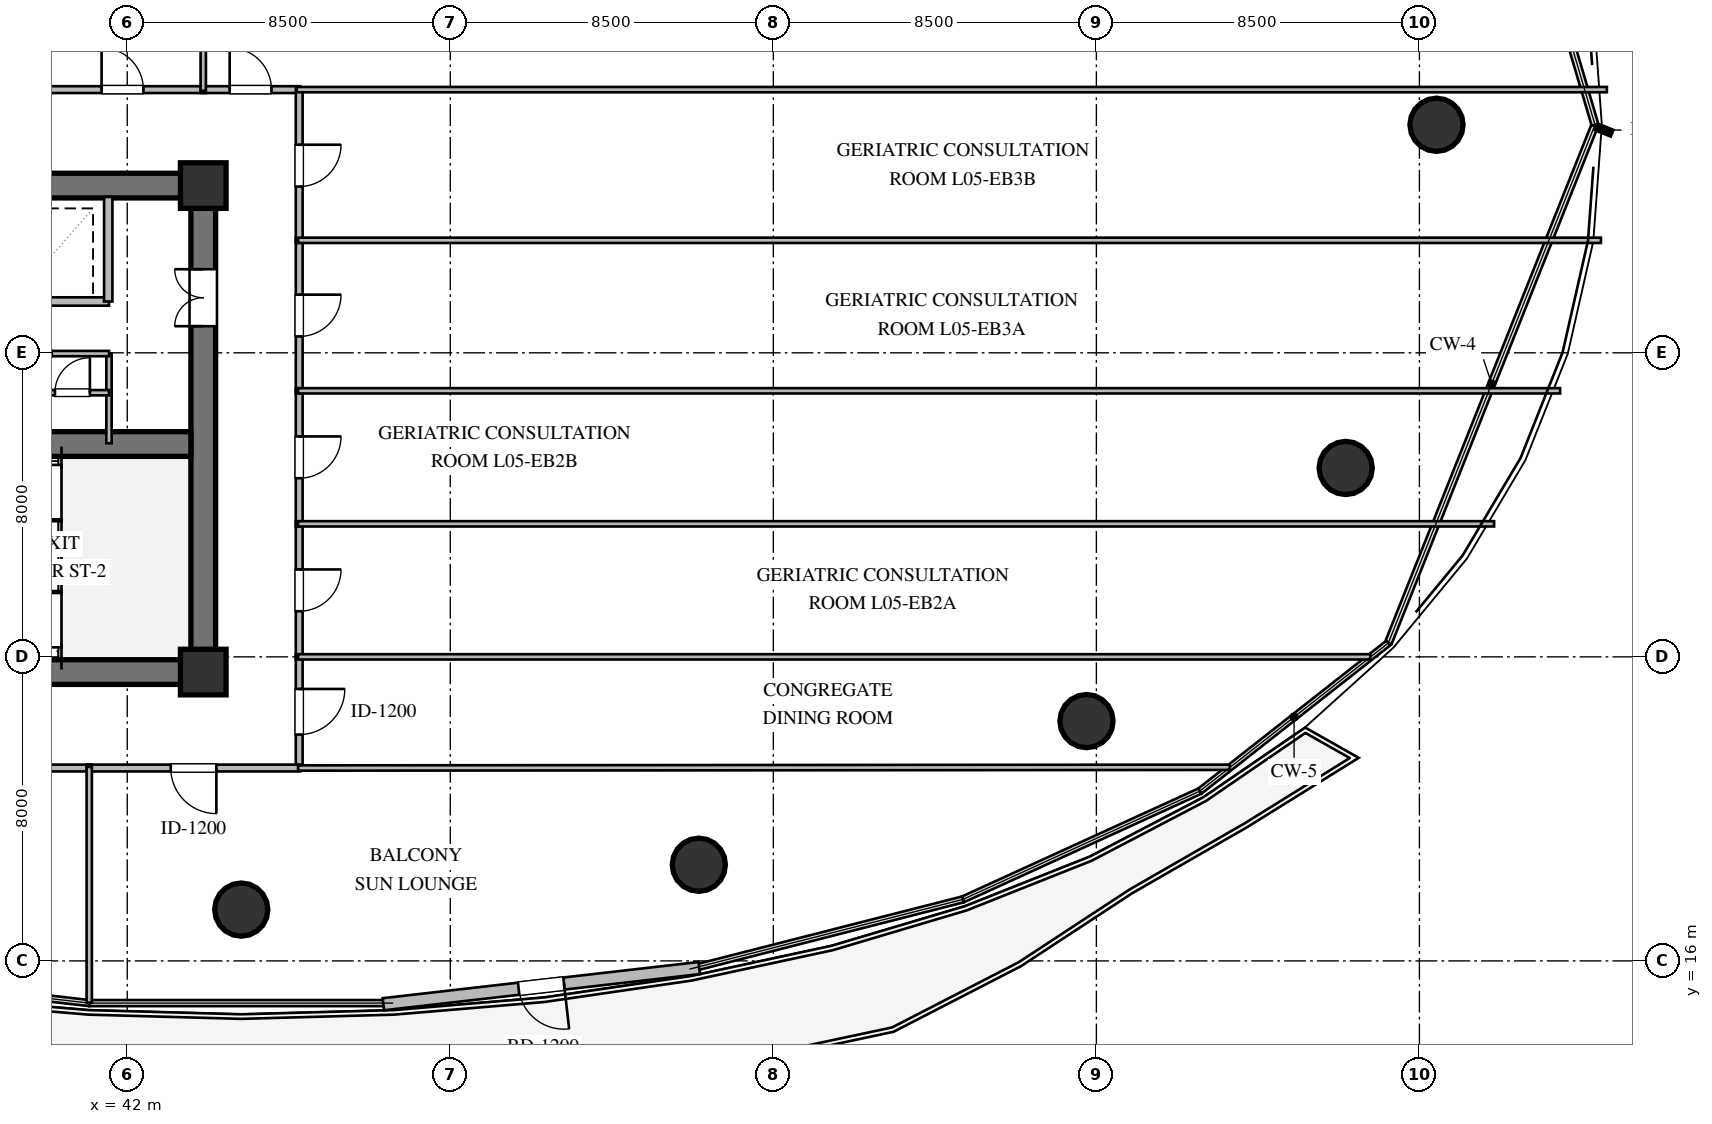
"""IFC4 building model, lengths in metres.
Left out: names, types, materials, properties, quantities, classifications, styles, units other than length and angle.
Written with IfcOpenShell. Run it as: python <this file> out.ifc"""

import sys

from ifc_helpers import new_model, si_unit, direction, frame, frame_2d, origin, origin_2d, place, context, subcontext, project, spatial, rectangle, circle, extrude, element, fill, save


model = new_model("IFC4")
c1 = context("Model", 3, precision=1e-05, world=origin(), true_north=direction((0.0, 1.0)))
c2 = subcontext(c1, "Body", "Model", "MODEL_VIEW")
j1 = project(units=[si_unit("LENGTHUNIT", "METRE"), si_unit("PLANEANGLEUNIT", "RADIAN")], contexts=[c1])
p1 = place(None, origin())
s1 = spatial("IfcSite", under=j1, at=p1, CompositionType="ELEMENT")
p2 = place(p1, origin())
s2 = spatial("IfcBuilding", under=s1, at=p2, CompositionType="ELEMENT")
p3 = place(p2, frame((0.0, 0.0, 24.0)))
s3 = spatial("IfcBuildingStorey", under=s2, at=p3, CompositionType="ELEMENT", Elevation=24.0)
for number, where, z_axis, x_axis in (
    (1, (21.675, 23.6, 0.0), (0.0, 0.0, 1.0), (1.0, 0.0, 0.0)),
    (2, (21.675, 36.4, 0.0), (0.0, 0.0, 1.0), (1.0, 0.0, 0.0)),
):
    element("IfcWall", number, at=place(p3, frame(where, z_axis=z_axis, x_axis=x_axis)), inside=s3, PredefinedType="SHEAR", context=c2, shape_type="SweptSolid", body=[
        extrude(rectangle(XDim=22.65, YDim=0.65, at=frame_2d((11.325, 0.0))), origin(), (0.0, 0.0, 1.0), 3.36),
    ])
p4 = place(p3, frame((44.0, 23.925, 0.0), z_axis=(0.0, 0.0, 1.0), x_axis=(0.0, 1.0, 0.0)))
e3 = element("IfcWall", 3, at=p4, inside=s3, PredefinedType="SHEAR", context=c2, shape_type="SweptSolid", body=[
    extrude(rectangle(XDim=12.15, YDim=0.65, at=frame_2d((6.075, 0.0))), origin(), (0.0, 0.0, 1.0), 3.36),
])
p5 = place(p4, frame((8.775, 0.0, 0.0)))
e4 = element("IfcOpeningElement", 4, at=p5, cuts=e3, PredefinedType="OPENING", context=c2, shape_type="SweptSolid", body=[
    extrude(rectangle(XDim=1.5, YDim=2.15, at=frame_2d((0.75, 1.075))), frame((0.0, 0.335, 0.0), z_axis=(0.0, -1.0, 0.0), x_axis=(1.0, 0.0, 0.0)), (0.0, 0.0, 1.0), 0.67),
])
p6 = place(p3, frame((22.325, 29.6, 0.0), z_axis=(0.0, 0.0, 1.0), x_axis=(1.0, 0.0, 0.0)))
e5 = element("IfcWall", 5, at=p6, inside=s3, PredefinedType="SHEAR", context=c2, shape_type="SweptSolid", body=[
    extrude(rectangle(XDim=21.35, YDim=0.65, at=frame_2d((10.675, 0.0))), origin(), (0.0, 0.0, 1.0), 3.36),
])
p7 = place(p6, frame((12.125, 0.0, 0.0)))
e6 = element("IfcOpeningElement", 6, at=p7, cuts=e5, PredefinedType="OPENING", context=c2, shape_type="SweptSolid", body=[
    extrude(rectangle(XDim=1.15, YDim=2.1, at=frame_2d((0.575, 1.05))), frame((0.0, 0.335, 0.0), z_axis=(0.0, -1.0, 0.0), x_axis=(1.0, 0.0, 0.0)), (0.0, 0.0, 1.0), 0.67),
])
for number, where, z_axis, x_axis in (
    (7, (44.0, 23.6, 0.0), (0.0, 0.0, 1.0), (1.0, 0.0, 0.0)),
    (8, (44.0, 36.4, 0.0), (0.0, 0.0, 1.0), (1.0, 0.0, 0.0)),
):
    element("IfcColumn", number, at=place(p3, frame(where, z_axis=z_axis, x_axis=x_axis)), inside=s3, PredefinedType="COLUMN", context=c2, shape_type="SweptSolid", body=[
        extrude(rectangle(XDim=1.2, YDim=1.2, at=origin_2d()), origin(), (0.0, 0.0, 1.0), 3.6),
    ])
for number, where, z_axis, x_axis in (
    (9, (76.45, 38.0, 0.0), (0.0, 0.0, 1.0), (1.0, 0.0, 0.0)),
    (10, (45.0, 17.35, 0.0), (0.0, 0.0, 1.0), (1.0, 0.0, 0.0)),
    (11, (57.04, 18.53, 0.0), (0.0, 0.0, 1.0), (1.0, 0.0, 0.0)),
    (12, (67.24, 22.31, 0.0), (0.0, 0.0, 1.0), (1.0, 0.0, 0.0)),
    (13, (74.06, 28.97, 0.0), (0.0, 0.0, 1.0), (1.0, 0.0, 0.0)),
):
    element("IfcColumn", number, at=place(p3, frame(where, z_axis=z_axis, x_axis=x_axis)), inside=s3, PredefinedType="COLUMN", context=c2, shape_type="SweptSolid", body=[
        extrude(circle(Radius=0.7, at=origin_2d()), origin(), (0.0, 0.0, 1.0), 3.6),
    ])
p8 = place(p3, frame((57.05, 15.812, 0.0), z_axis=(0.0, 0.0, 1.0), x_axis=(-0.993503192468, -0.113804246649, 0.0)))
e14 = element("IfcWall", 14, at=p8, inside=s3, PredefinedType="STANDARD", context=c2, shape_type="SweptSolid", body=[
    extrude(rectangle(XDim=8.365, YDim=0.32, at=frame_2d((4.182, 0.0))), origin(), (0.0, 0.0, 1.0), 3.36),
])
p9 = place(p8, frame((3.582, 0.0, 0.0)))
e15 = element("IfcOpeningElement", 15, at=p9, cuts=e14, PredefinedType="OPENING", context=c2, shape_type="SweptSolid", body=[
    extrude(rectangle(XDim=1.2, YDim=2.15, at=frame_2d((0.6, 1.075))), frame((0.0, 0.17, 0.0), z_axis=(0.0, -1.0, 0.0), x_axis=(1.0, 0.0, 0.0)), (0.0, 0.0, 1.0), 0.34),
])
p10 = place(p3, frame((33.98, 33.35, 0.0), z_axis=(0.0, 0.0, 1.0), x_axis=(1.0, 0.0, 0.0)))
e16 = element("IfcWall", 16, at=p10, inside=s3, PredefinedType="SOLIDWALL", context=c2, shape_type="SweptSolid", body=[
    extrude(rectangle(XDim=7.54, YDim=0.22, at=frame_2d((3.77, 0.0))), origin(), (0.0, 0.0, 1.0), 3.36),
])
p11 = place(p3, frame((41.5, 33.35, 0.0), z_axis=(0.0, 0.0, 1.0), x_axis=(0.0, 1.0, 0.0)))
e17 = element("IfcWall", 17, at=p11, inside=s3, PredefinedType="SOLIDWALL", context=c2, shape_type="SweptSolid", body=[
    extrude(rectangle(XDim=2.75, YDim=0.22, at=frame_2d((1.375, 0.0))), origin(), (0.0, 0.0, 1.0), 3.36),
])
p12 = place(p3, frame((41.52, 29.62, 0.0), z_axis=(0.0, 0.0, 1.0), x_axis=(0.0, 1.0, 0.0)))
e18 = element("IfcWall", 18, at=p12, inside=s3, PredefinedType="PARTITIONING", context=c2, shape_type="SweptSolid", body=[
    extrude(rectangle(XDim=2.36, YDim=0.14, at=frame_2d((1.18, 0.0))), origin(), (0.0, 0.0, 1.0), 3.36),
])
p13 = place(p3, frame((38.48, 30.95, 0.0), z_axis=(0.0, 0.0, 1.0), x_axis=(1.0, 0.0, 0.0)))
e19 = element("IfcWall", 19, at=p13, inside=s3, PredefinedType="PARTITIONING", context=c2, shape_type="SweptSolid", body=[
    extrude(rectangle(XDim=3.04, YDim=0.14, at=frame_2d((1.52, 0.0))), origin(), (0.0, 0.0, 1.0), 3.36),
])
p14 = place(p13, frame((1.617, 0.0, 0.0)))
e20 = element("IfcOpeningElement", 20, at=p14, cuts=e19, PredefinedType="OPENING", context=c2, shape_type="SweptSolid", body=[
    extrude(rectangle(XDim=0.92, YDim=2.1, at=frame_2d((0.46, 1.05))), frame((0.0, 0.08, 0.0), z_axis=(0.0, -1.0, 0.0), x_axis=(1.0, 0.0, 0.0)), (0.0, 0.0, 1.0), 0.16),
])
p15 = place(p3, frame((38.48, 31.98, 0.0), z_axis=(0.0, 0.0, 1.0), x_axis=(1.0, 0.0, 0.0)))
e21 = element("IfcWall", 21, at=p15, inside=s3, PredefinedType="PARTITIONING", context=c2, shape_type="SweptSolid", body=[
    extrude(rectangle(XDim=3.04, YDim=0.14, at=frame_2d((1.52, 0.0))), origin(), (0.0, 0.0, 1.0), 3.36),
])
p16 = place(p15, frame((0.614, 0.0, 0.0)))
e22 = element("IfcOpeningElement", 22, at=p16, cuts=e21, PredefinedType="OPENING", context=c2, shape_type="SweptSolid", body=[
    extrude(rectangle(XDim=0.92, YDim=2.1, at=frame_2d((0.46, 1.05))), frame((0.0, 0.08, 0.0), z_axis=(0.0, -1.0, 0.0), x_axis=(1.0, 0.0, 0.0)), (0.0, 0.0, 1.0), 0.16),
])
p17 = place(p3, frame((39.685, 38.925, 0.0), z_axis=(0.0, 0.0, 1.0), x_axis=(1.0, 0.0, 0.0)))
e23 = element("IfcWall", 23, at=p17, inside=s3, PredefinedType="PARTITIONING", context=c2, shape_type="SweptSolid", body=[
    extrude(rectangle(XDim=4.38, YDim=0.18, at=frame_2d((2.19, 0.0))), origin(), (0.0, 0.0, 1.0), 3.36),
])
p18 = place(p17, frame((1.64, 0.0, 0.0)))
e24 = element("IfcOpeningElement", 24, at=p18, cuts=e23, PredefinedType="OPENING", context=c2, shape_type="SweptSolid", body=[
    extrude(rectangle(XDim=1.1, YDim=2.1, at=frame_2d((0.55, 1.05))), frame((0.0, 0.1, 0.0), z_axis=(0.0, -1.0, 0.0), x_axis=(1.0, 0.0, 0.0)), (0.0, 0.0, 1.0), 0.2),
])
p19 = place(p3, frame((43.935, 38.925, 0.0), z_axis=(0.0, 0.0, 1.0), x_axis=(1.0, 0.0, 0.0)))
e25 = element("IfcWall", 25, at=p19, inside=s3, PredefinedType="PARTITIONING", context=c2, shape_type="SweptSolid", body=[
    extrude(rectangle(XDim=2.62, YDim=0.18, at=frame_2d((1.31, 0.0))), origin(), (0.0, 0.0, 1.0), 3.36),
])
p20 = place(p19, frame((0.76, 0.0, 0.0)))
e26 = element("IfcOpeningElement", 26, at=p20, cuts=e25, PredefinedType="OPENING", context=c2, shape_type="SweptSolid", body=[
    extrude(rectangle(XDim=1.1, YDim=2.1, at=frame_2d((0.55, 1.05))), frame((0.0, 0.1, 0.0), z_axis=(0.0, -1.0, 0.0), x_axis=(1.0, 0.0, 0.0)), (0.0, 0.0, 1.0), 0.2),
])
p21 = place(p3, frame((46.525, 24.065, 0.0), z_axis=(0.0, 0.0, 1.0), x_axis=(0.0, -1.0, 0.0)))
e27 = element("IfcWall", 27, at=p21, inside=s3, PredefinedType="PARTITIONING", context=c2, shape_type="SweptSolid", body=[
    extrude(rectangle(XDim=3.02, YDim=0.18, at=frame_2d((1.51, 0.0))), origin(), (0.0, 0.0, 1.0), 3.36),
])
p22 = place(p21, frame((0.91, 0.0, 0.0)))
e28 = element("IfcOpeningElement", 28, at=p22, cuts=e27, PredefinedType="OPENING", context=c2, shape_type="SweptSolid", body=[
    extrude(rectangle(XDim=1.2, YDim=2.15, at=frame_2d((0.6, 1.075))), frame((0.0, 0.1, 0.0), z_axis=(0.0, -1.0, 0.0), x_axis=(1.0, 0.0, 0.0)), (0.0, 0.0, 1.0), 0.2),
])
p23 = place(p3, frame((46.525, 27.565, 0.0), z_axis=(0.0, 0.0, 1.0), x_axis=(0.0, -1.0, 0.0)))
e29 = element("IfcWall", 29, at=p23, inside=s3, PredefinedType="PARTITIONING", context=c2, shape_type="SweptSolid", body=[
    extrude(rectangle(XDim=3.63, YDim=0.18, at=frame_2d((1.815, 0.0))), origin(), (0.0, 0.0, 1.0), 3.36),
])
p24 = place(p23, frame((1.265, 0.0, 0.0)))
e30 = element("IfcOpeningElement", 30, at=p24, cuts=e29, PredefinedType="OPENING", context=c2, shape_type="SweptSolid", body=[
    extrude(rectangle(XDim=1.1, YDim=2.1, at=frame_2d((0.55, 1.05))), frame((0.0, 0.1, 0.0), z_axis=(0.0, -1.0, 0.0), x_axis=(1.0, 0.0, 0.0)), (0.0, 0.0, 1.0), 0.2),
])
p25 = place(p3, frame((46.525, 31.065, 0.0), z_axis=(0.0, 0.0, 1.0), x_axis=(0.0, -1.0, 0.0)))
e31 = element("IfcWall", 31, at=p25, inside=s3, PredefinedType="PARTITIONING", context=c2, shape_type="SweptSolid", body=[
    extrude(rectangle(XDim=3.63, YDim=0.18, at=frame_2d((1.815, 0.0))), origin(), (0.0, 0.0, 1.0), 3.36),
])
p26 = place(p25, frame((1.265, 0.0, 0.0)))
e32 = element("IfcOpeningElement", 32, at=p26, cuts=e31, PredefinedType="OPENING", context=c2, shape_type="SweptSolid", body=[
    extrude(rectangle(XDim=1.1, YDim=2.1, at=frame_2d((0.55, 1.05))), frame((0.0, 0.1, 0.0), z_axis=(0.0, -1.0, 0.0), x_axis=(1.0, 0.0, 0.0)), (0.0, 0.0, 1.0), 0.2),
])
p27 = place(p3, frame((46.525, 35.025, 0.0), z_axis=(0.0, 0.0, 1.0), x_axis=(0.0, -1.0, 0.0)))
e33 = element("IfcWall", 33, at=p27, inside=s3, PredefinedType="PARTITIONING", context=c2, shape_type="SweptSolid", body=[
    extrude(rectangle(XDim=4.09, YDim=0.18, at=frame_2d((2.045, 0.0))), origin(), (0.0, 0.0, 1.0), 3.36),
])
p28 = place(p27, frame((1.495, 0.0, 0.0)))
e34 = element("IfcOpeningElement", 34, at=p28, cuts=e33, PredefinedType="OPENING", context=c2, shape_type="SweptSolid", body=[
    extrude(rectangle(XDim=1.1, YDim=2.1, at=frame_2d((0.55, 1.05))), frame((0.0, 0.1, 0.0), z_axis=(0.0, -1.0, 0.0), x_axis=(1.0, 0.0, 0.0)), (0.0, 0.0, 1.0), 0.2),
])
p29 = place(p3, frame((46.525, 38.955, 0.0), z_axis=(0.0, 0.0, 1.0), x_axis=(0.0, -1.0, 0.0)))
e35 = element("IfcWall", 35, at=p29, inside=s3, PredefinedType="PARTITIONING", context=c2, shape_type="SweptSolid", body=[
    extrude(rectangle(XDim=4.06, YDim=0.18, at=frame_2d((2.03, 0.0))), origin(), (0.0, 0.0, 1.0), 3.36),
])
p30 = place(p29, frame((1.48, 0.0, 0.0)))
e36 = element("IfcOpeningElement", 36, at=p30, cuts=e35, PredefinedType="OPENING", context=c2, shape_type="SweptSolid", body=[
    extrude(rectangle(XDim=1.1, YDim=2.1, at=frame_2d((0.55, 1.05))), frame((0.0, 0.1, 0.0), z_axis=(0.0, -1.0, 0.0), x_axis=(1.0, 0.0, 0.0)), (0.0, 0.0, 1.0), 0.2),
])
p31 = place(p3, frame((41.065, 21.075, 0.0), z_axis=(0.0, 0.0, 1.0), x_axis=(-1.0, 0.0, 0.0)))
e37 = element("IfcWall", 37, at=p31, inside=s3, PredefinedType="PARTITIONING", context=c2, shape_type="SweptSolid", body=[
    extrude(rectangle(XDim=7.13, YDim=0.18, at=frame_2d((3.565, 0.0))), origin(), (0.0, 0.0, 1.0), 2.996),
])
p32 = place(p31, frame((3.015, 0.0, 0.0)))
e38 = element("IfcOpeningElement", 38, at=p32, cuts=e37, PredefinedType="OPENING", context=c2, shape_type="SweptSolid", body=[
    extrude(rectangle(XDim=1.1, YDim=2.1, at=frame_2d((0.55, 1.05))), frame((0.0, 0.1, 0.0), z_axis=(0.0, -1.0, 0.0), x_axis=(1.0, 0.0, 0.0)), (0.0, 0.0, 1.0), 0.2),
])
p33 = place(p3, frame((46.555, 21.075, 0.0), z_axis=(0.0, 0.0, 1.0), x_axis=(-1.0, 0.0, 0.0)))
e39 = element("IfcWall", 39, at=p33, inside=s3, PredefinedType="PARTITIONING", context=c2, shape_type="SweptSolid", body=[
    extrude(rectangle(XDim=5.62, YDim=0.18, at=frame_2d((2.81, 0.0))), origin(), (0.0, 0.0, 1.0), 3.36),
])
p34 = place(p33, frame((2.21, 0.0, 0.0)))
e40 = element("IfcOpeningElement", 40, at=p34, cuts=e39, PredefinedType="OPENING", context=c2, shape_type="SweptSolid", body=[
    extrude(rectangle(XDim=1.2, YDim=2.15, at=frame_2d((0.6, 1.075))), frame((0.0, 0.1, 0.0), z_axis=(0.0, -1.0, 0.0), x_axis=(1.0, 0.0, 0.0)), (0.0, 0.0, 1.0), 0.2),
])
p35 = place(p3, frame((44.0, 67.706, 0.0), z_axis=(0.0, 0.0, 1.0), x_axis=(0.0, -1.0, 0.0)))
e41 = element("IfcWall", 41, at=p35, inside=s3, PredefinedType="PARTITIONING", context=c2, shape_type="SweptSolid", body=[
    extrude(rectangle(XDim=28.811, YDim=0.14, at=frame_2d((14.406, 0.0))), origin(), (0.0, 0.0, 1.0), 2.89),
])
p36 = place(p3, frame((80.932, 38.925, 0.0), z_axis=(0.0, 0.0, 1.0), x_axis=(-1.0, 0.0, 0.0)))
e42 = element("IfcWall", 42, at=p36, inside=s3, PredefinedType="PARTITIONING", context=c2, shape_type="SweptSolid", body=[
    extrude(rectangle(XDim=34.472, YDim=0.14, at=frame_2d((17.236, 0.0))), origin(), (0.0, 0.0, 1.0), 3.36),
])
p37 = place(p3, frame((46.495, 24.0, 0.0), z_axis=(0.0, 0.0, 1.0), x_axis=(1.0, 0.0, 0.0)))
e43 = element("IfcWall", 43, at=p37, inside=s3, PredefinedType="PARTITIONING", context=c2, shape_type="SweptSolid", body=[
    extrude(rectangle(XDim=28.214, YDim=0.14, at=frame_2d((14.107, 0.0))), origin(), (0.0, 0.0, 1.0), 2.89),
])
p38 = place(p3, frame((71.011, 21.094, 0.0), z_axis=(0.0, 0.0, 1.0), x_axis=(-0.999999682646, -0.000796685534, 0.0)))
e44 = element("IfcWall", 44, at=p38, inside=s3, PredefinedType="PARTITIONING", context=c2, shape_type="SweptSolid", body=[
    extrude(rectangle(XDim=24.516, YDim=0.14, at=frame_2d((12.258, 0.0))), origin(), (0.0, 0.0, 1.0), 2.996),
])
p39 = place(p3, frame((46.495, 27.5, 0.0), z_axis=(0.0, 0.0, 1.0), x_axis=(1.0, 0.0, 0.0)))
e45 = element("IfcWall", 45, at=p39, inside=s3, PredefinedType="PARTITIONING", context=c2, shape_type="SweptSolid", body=[
    extrude(rectangle(XDim=31.47, YDim=0.14, at=frame_2d((15.735, 0.0))), origin(), (0.0, 0.0, 1.0), 2.89),
])
p40 = place(p3, frame((46.495, 31.0, 0.0), z_axis=(0.0, 0.0, 1.0), x_axis=(1.0, 0.0, 0.0)))
e46 = element("IfcWall", 46, at=p40, inside=s3, PredefinedType="PARTITIONING", context=c2, shape_type="SweptSolid", body=[
    extrude(rectangle(XDim=33.207, YDim=0.14, at=frame_2d((16.604, 0.0))), origin(), (0.0, 0.0, 1.0), 3.36),
])
p41 = place(p3, frame((46.495, 34.96, 0.0), z_axis=(0.0, 0.0, 1.0), x_axis=(1.0, 0.0, 0.0)))
e47 = element("IfcWall", 47, at=p41, inside=s3, PredefinedType="PARTITIONING", context=c2, shape_type="SweptSolid", body=[
    extrude(rectangle(XDim=34.281, YDim=0.14, at=frame_2d((17.14, 0.0))), origin(), (0.0, 0.0, 1.0), 3.36),
])
p42 = place(p3, frame((41.0, 21.105, 0.0), z_axis=(0.0, 0.0, 1.0), x_axis=(0.0, -1.0, 0.0)))
e48 = element("IfcWall", 48, at=p42, inside=s3, PredefinedType="PARTITIONING", context=c2, shape_type="SweptSolid", body=[
    extrude(rectangle(XDim=6.205, YDim=0.14, at=frame_2d((3.103, 0.0))), origin(), (0.0, 0.0, 1.0), 3.36),
])
p43 = place(p9, origin())
e49 = element("IfcDoor", 49, at=p43, inside=s3, OperationType="SINGLE_SWING_LEFT", PredefinedType="DOOR", context=c2, shape_type="SweptSolid", body=[
    extrude(rectangle(XDim=1.2, YDim=2.15, at=frame_2d((0.6, 1.075))), frame((0.0, 0.025, 0.0), z_axis=(0.0, -1.0, 0.0), x_axis=(1.0, 0.0, 0.0)), (0.0, 0.0, 1.0), 0.05),
])
fill(e15, e49)
p44 = place(p5, origin())
e50 = element("IfcDoor", 50, at=p44, inside=s3, OperationType="DOUBLE_DOOR_SINGLE_SWING", PredefinedType="DOOR", context=c2, shape_type="SweptSolid", body=[
    extrude(rectangle(XDim=1.5, YDim=2.15, at=frame_2d((0.75, 1.075))), frame((0.0, 0.025, 0.0), z_axis=(0.0, -1.0, 0.0), x_axis=(1.0, 0.0, 0.0)), (0.0, 0.0, 1.0), 0.05),
])
fill(e4, e50)
p45 = place(p14, origin())
e51 = element("IfcDoor", 51, at=p45, inside=s3, OperationType="SINGLE_SWING_RIGHT", PredefinedType="DOOR", context=c2, shape_type="SweptSolid", body=[
    extrude(rectangle(XDim=0.92, YDim=2.1, at=frame_2d((0.46, 1.05))), frame((0.0, 0.025, 0.0), z_axis=(0.0, -1.0, 0.0), x_axis=(1.0, 0.0, 0.0)), (0.0, 0.0, 1.0), 0.05),
])
fill(e20, e51)
p46 = place(p18, origin())
e52 = element("IfcDoor", 52, at=p46, inside=s3, OperationType="SINGLE_SWING_LEFT", PredefinedType="DOOR", context=c2, shape_type="SweptSolid", body=[
    extrude(rectangle(XDim=1.1, YDim=2.1, at=frame_2d((0.55, 1.05))), frame((0.0, 0.025, 0.0), z_axis=(0.0, -1.0, 0.0), x_axis=(1.0, 0.0, 0.0)), (0.0, 0.0, 1.0), 0.05),
])
fill(e24, e52)
p47 = place(p20, origin())
e53 = element("IfcDoor", 53, at=p47, inside=s3, OperationType="SINGLE_SWING_LEFT", PredefinedType="DOOR", context=c2, shape_type="SweptSolid", body=[
    extrude(rectangle(XDim=1.1, YDim=2.1, at=frame_2d((0.55, 1.05))), frame((0.0, 0.025, 0.0), z_axis=(0.0, -1.0, 0.0), x_axis=(1.0, 0.0, 0.0)), (0.0, 0.0, 1.0), 0.05),
])
fill(e26, e53)
p48 = place(p22, origin())
e54 = element("IfcDoor", 54, at=p48, inside=s3, OperationType="SINGLE_SWING_LEFT", PredefinedType="DOOR", context=c2, shape_type="SweptSolid", body=[
    extrude(rectangle(XDim=1.2, YDim=2.15, at=frame_2d((0.6, 1.075))), frame((0.0, 0.025, 0.0), z_axis=(0.0, -1.0, 0.0), x_axis=(1.0, 0.0, 0.0)), (0.0, 0.0, 1.0), 0.05),
])
fill(e28, e54)
p49 = place(p24, origin())
e55 = element("IfcDoor", 55, at=p49, inside=s3, OperationType="SINGLE_SWING_LEFT", PredefinedType="DOOR", context=c2, shape_type="SweptSolid", body=[
    extrude(rectangle(XDim=1.1, YDim=2.1, at=frame_2d((0.55, 1.05))), frame((0.0, 0.025, 0.0), z_axis=(0.0, -1.0, 0.0), x_axis=(1.0, 0.0, 0.0)), (0.0, 0.0, 1.0), 0.05),
])
fill(e30, e55)
p50 = place(p26, origin())
e56 = element("IfcDoor", 56, at=p50, inside=s3, OperationType="SINGLE_SWING_LEFT", PredefinedType="DOOR", context=c2, shape_type="SweptSolid", body=[
    extrude(rectangle(XDim=1.1, YDim=2.1, at=frame_2d((0.55, 1.05))), frame((0.0, 0.025, 0.0), z_axis=(0.0, -1.0, 0.0), x_axis=(1.0, 0.0, 0.0)), (0.0, 0.0, 1.0), 0.05),
])
fill(e32, e56)
p51 = place(p28, origin())
e57 = element("IfcDoor", 57, at=p51, inside=s3, OperationType="SINGLE_SWING_LEFT", PredefinedType="DOOR", context=c2, shape_type="SweptSolid", body=[
    extrude(rectangle(XDim=1.1, YDim=2.1, at=frame_2d((0.55, 1.05))), frame((0.0, 0.025, 0.0), z_axis=(0.0, -1.0, 0.0), x_axis=(1.0, 0.0, 0.0)), (0.0, 0.0, 1.0), 0.05),
])
fill(e34, e57)
p52 = place(p30, origin())
e58 = element("IfcDoor", 58, at=p52, inside=s3, OperationType="SINGLE_SWING_LEFT", PredefinedType="DOOR", context=c2, shape_type="SweptSolid", body=[
    extrude(rectangle(XDim=1.1, YDim=2.1, at=frame_2d((0.55, 1.05))), frame((0.0, 0.025, 0.0), z_axis=(0.0, -1.0, 0.0), x_axis=(1.0, 0.0, 0.0)), (0.0, 0.0, 1.0), 0.05),
])
fill(e36, e58)
p53 = place(p34, origin())
e59 = element("IfcDoor", 59, at=p53, inside=s3, OperationType="SINGLE_SWING_LEFT", PredefinedType="DOOR", context=c2, shape_type="SweptSolid", body=[
    extrude(rectangle(XDim=1.2, YDim=2.15, at=frame_2d((0.6, 1.075))), frame((0.0, 0.025, 0.0), z_axis=(0.0, -1.0, 0.0), x_axis=(1.0, 0.0, 0.0)), (0.0, 0.0, 1.0), 0.05),
])
fill(e40, e59)
save(model, sys.argv[1])
